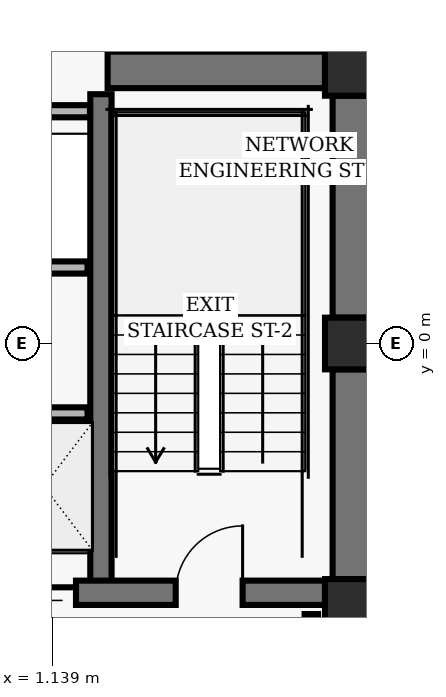
"""IFC4 building model, lengths in metres.
Left out: names, types, materials, properties, quantities, classifications, styles, units other than length and angle.
Written with IfcOpenShell. Run it as: python <this file> out.ifc"""

import sys

from ifc_helpers import new_model, si_unit, direction, frame, frame_2d, origin, origin_2d, place, context, subcontext, project, spatial, rectangle, hollow_rectangle, extrude, element, fill, save


model = new_model("IFC4")
c1 = context("Model", 3, precision=1e-05, world=origin(), true_north=direction((0.0, 1.0)))
c2 = subcontext(c1, "Body", "Model", "MODEL_VIEW")
j1 = project(units=[si_unit("LENGTHUNIT", "METRE"), si_unit("PLANEANGLEUNIT", "RADIAN")], contexts=[c1])
p1 = place(None, origin())
s1 = spatial("IfcSite", under=j1, at=p1, CompositionType="ELEMENT")
p2 = place(p1, origin())
s2 = spatial("IfcBuilding", under=s1, at=p2, CompositionType="ELEMENT")
p3 = place(p2, frame((0.0, 0.0, 138.08)))
s3 = spatial("IfcBuildingStorey", under=s2, at=p3, CompositionType="ELEMENT", Elevation=138.08)
for number, where, z_axis, x_axis in (
    (1, (6.05, 4.5, 0.0), (0.0, 0.0, 1.0), (1.0, 0.0, 0.0)),
    (2, (6.05, 0.0, 0.0), (0.0, 0.0, 1.0), (1.0, 0.0, 0.0)),
    (3, (6.05, -4.3, 0.0), (0.0, 0.0, 1.0), (1.0, 0.0, 0.0)),
):
    element("IfcColumn", number, at=place(p3, frame(where, z_axis=z_axis, x_axis=x_axis)), inside=s3, PredefinedType="COLUMN", context=c2, shape_type="SweptSolid", body=[
        extrude(hollow_rectangle(XDim=0.85, YDim=0.85, WallThickness=0.055, InnerFilletRadius=0.02, OuterFilletRadius=0.04, at=origin_2d()), origin(), (0.0, 0.0, 1.0), 3.04),
    ])
p4 = place(p3, frame((6.05, 0.425, 0.0), z_axis=(0.0, 0.0, 1.0), x_axis=(0.0, 1.0, 0.0)))
e4 = element("IfcWall", 4, at=p4, inside=s3, PredefinedType="SHEAR", context=c2, shape_type="SweptSolid", body=[
    extrude(rectangle(XDim=3.65, YDim=0.6, at=frame_2d((1.825, 0.0))), origin(), (0.0, 0.0, 1.0), 2.788),
])
p5 = place(p3, frame((6.05, -3.875, 0.0), z_axis=(0.0, 0.0, 1.0), x_axis=(0.0, 1.0, 0.0)))
e5 = element("IfcWall", 5, at=p5, inside=s3, PredefinedType="SHEAR", context=c2, shape_type="SweptSolid", body=[
    extrude(rectangle(XDim=3.45, YDim=0.6, at=frame_2d((1.725, 0.0))), origin(), (0.0, 0.0, 1.0), 2.788),
])
p6 = place(p3, frame((1.94, -4.1, 0.0), z_axis=(0.0, 0.0, 1.0), x_axis=(0.0, 1.0, 0.0)))
e6 = element("IfcWall", 6, at=p6, inside=s3, PredefinedType="SHEAR", context=c2, shape_type="SweptSolid", body=[
    extrude(rectangle(XDim=8.2, YDim=0.35, at=frame_2d((4.1, 0.0))), origin(), (0.0, 0.0, 1.0), 2.788),
])
p7 = place(p3, frame((-5.625, -4.1, 0.0), z_axis=(0.0, 0.0, 1.0), x_axis=(1.0, 0.0, 0.0)))
e7 = element("IfcWall", 7, at=p7, inside=s3, PredefinedType="SHEAR", context=c2, shape_type="SweptSolid", body=[
    extrude(rectangle(XDim=11.25, YDim=0.4, at=frame_2d((5.625, 0.0))), origin(), (0.0, 0.0, 1.0), 2.788),
])
p8 = place(p7, frame((1.355, 0.0, 0.0)))
e8 = element("IfcOpeningElement", 8, at=p8, cuts=e7, PredefinedType="OPENING", context=c2, shape_type="SweptSolid", body=[
    extrude(rectangle(XDim=1.1, YDim=2.04, at=frame_2d((0.55, 1.02))), frame((0.0, 0.21, 0.0), z_axis=(0.0, -1.0, 0.0), x_axis=(1.0, 0.0, 0.0)), (0.0, 0.0, 1.0), 0.42),
])
p9 = place(p7, frame((8.795, 0.0, 0.0)))
e9 = element("IfcOpeningElement", 9, at=p9, cuts=e7, PredefinedType="OPENING", context=c2, shape_type="SweptSolid", body=[
    extrude(rectangle(XDim=1.1, YDim=2.04, at=frame_2d((0.55, 1.02))), frame((0.0, 0.21, 0.0), z_axis=(0.0, -1.0, 0.0), x_axis=(1.0, 0.0, 0.0)), (0.0, 0.0, 1.0), 0.42),
])
p10 = place(p7, frame((4.095, 0.0, 0.0)))
e10 = element("IfcOpeningElement", 10, at=p10, cuts=e7, PredefinedType="OPENING", context=c2, shape_type="SweptSolid", body=[
    extrude(rectangle(XDim=1.06, YDim=2.04, at=frame_2d((0.53, 1.02))), frame((0.0, 0.21, 0.0), z_axis=(0.0, -1.0, 0.0), x_axis=(1.0, 0.0, 0.0)), (0.0, 0.0, 1.0), 0.42),
])
p11 = place(p7, frame((6.095, 0.0, 0.0)))
e11 = element("IfcOpeningElement", 11, at=p11, cuts=e7, PredefinedType="OPENING", context=c2, shape_type="SweptSolid", body=[
    extrude(rectangle(XDim=1.06, YDim=2.04, at=frame_2d((0.53, 1.02))), frame((0.0, 0.21, 0.0), z_axis=(0.0, -1.0, 0.0), x_axis=(1.0, 0.0, 0.0)), (0.0, 0.0, 1.0), 0.42),
])
p12 = place(p3, frame((2.05, 4.5, 0.0), z_axis=(0.0, 0.0, 1.0), x_axis=(1.0, 0.0, 0.0)))
e12 = element("IfcWall", 12, at=p12, inside=s3, PredefinedType="SHEAR", context=c2, shape_type="SweptSolid", body=[
    extrude(rectangle(XDim=3.575, YDim=0.6, at=frame_2d((1.788, 0.0))), origin(), (0.0, 0.0, 1.0), 2.788),
])
p13 = place(p3, frame((-1.72, -1.15, 0.0), z_axis=(0.0, 0.0, 1.0), x_axis=(1.0, 0.0, 0.0)))
e13 = element("IfcWall", 13, at=p13, inside=s3, PredefinedType="PARTITIONING", context=c2, shape_type="SweptSolid", body=[
    extrude(rectangle(XDim=3.44, YDim=0.2, at=frame_2d((1.72, 0.0))), origin(), (0.0, 0.0, 1.0), 2.763),
])
p14 = place(p3, frame((5.4, -7.16, 0.0), z_axis=(0.0, 0.0, 1.0), x_axis=(0.0, 1.0, 0.0)))
e14 = element("IfcWall", 14, at=p14, inside=s3, PredefinedType="PARTITIONING", context=c2, shape_type="SweptSolid", body=[
    extrude(rectangle(XDim=2.71, YDim=0.22, at=frame_2d((1.355, 0.0))), origin(), (0.0, 0.0, 1.0), 2.763),
])
p15 = place(p3, frame((-1.72, 1.25, 0.0), z_axis=(0.0, 0.0, 1.0), x_axis=(1.0, 0.0, 0.0)))
e15 = element("IfcWall", 15, at=p15, inside=s3, PredefinedType="PARTITIONING", context=c2, shape_type="SweptSolid", body=[
    extrude(rectangle(XDim=3.44, YDim=0.2, at=frame_2d((1.72, 0.0))), origin(), (0.0, 0.0, 1.0), 2.763),
])
p16 = place(p3, frame((-1.76, 3.82, 0.0), z_axis=(0.0, 0.0, 1.0), x_axis=(1.0, 0.0, 0.0)))
e16 = element("IfcWall", 16, at=p16, inside=s3, PredefinedType="PARTITIONING", context=c2, shape_type="SweptSolid", body=[
    extrude(rectangle(XDim=3.52, YDim=0.2, at=frame_2d((1.76, 0.0))), origin(), (0.0, 0.0, 1.0), 2.763),
])
p17 = place(p9, origin())
e17 = element("IfcDoor", 17, at=p17, inside=s3, OperationType="SINGLE_SWING_RIGHT", PredefinedType="DOOR", context=c2, shape_type="SweptSolid", body=[
    extrude(rectangle(XDim=1.1, YDim=2.04, at=frame_2d((0.55, 1.02))), frame((0.0, 0.025, 0.0), z_axis=(0.0, -1.0, 0.0), x_axis=(1.0, 0.0, 0.0)), (0.0, 0.0, 1.0), 0.05),
])
fill(e9, e17)
p18 = place(p11, origin())
e18 = element("IfcDoor", 18, at=p18, inside=s3, OperationType="SLIDING_TO_RIGHT", PredefinedType="DOOR", context=c2, shape_type="SweptSolid", body=[
    extrude(rectangle(XDim=1.06, YDim=2.04, at=frame_2d((0.53, 1.02))), frame((0.0, 0.025, 0.0), z_axis=(0.0, -1.0, 0.0), x_axis=(1.0, 0.0, 0.0)), (0.0, 0.0, 1.0), 0.05),
])
fill(e11, e18)
save(model, sys.argv[1])
